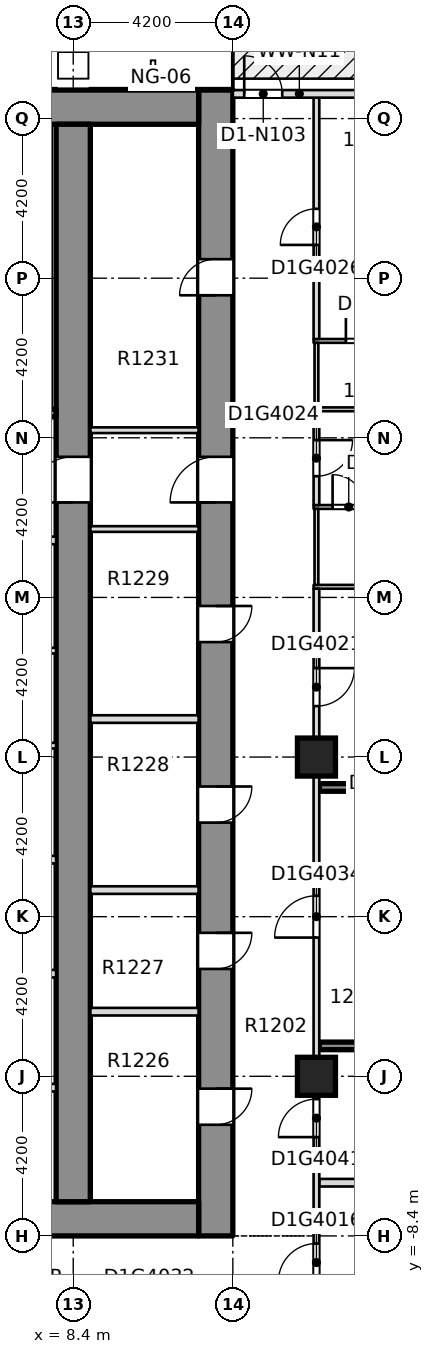
"""IFC4 building model, lengths in metres.
Left out: names, types, materials, properties, quantities, classifications, styles, units other than length and angle.
Written with IfcOpenShell. Run it as: python <this file> out.ifc"""

import sys

from ifc_helpers import new_model, si_unit, direction, frame, frame_2d, origin, origin_2d, place, context, subcontext, project, spatial, rectangle, extrude, element, fill, save


model = new_model("IFC4")
c1 = context("Model", 3, precision=1e-05, world=origin(), true_north=direction((0.0, 1.0)))
c2 = subcontext(c1, "Body", "Model", "MODEL_VIEW")
j1 = project(units=[si_unit("LENGTHUNIT", "METRE"), si_unit("PLANEANGLEUNIT", "RADIAN")], contexts=[c1])
p1 = place(None, origin())
s1 = spatial("IfcSite", under=j1, at=p1, CompositionType="ELEMENT")
p2 = place(p1, origin())
s2 = spatial("IfcBuilding", under=s1, at=p2, CompositionType="ELEMENT")
p3 = place(p2, frame((0.0, 0.0, 55.2)))
s3 = spatial("IfcBuildingStorey", under=s2, at=p3, CompositionType="ELEMENT", Elevation=55.2)
p4 = place(p3, frame((12.15, -8.4, -0.32), z_axis=(0.0, 0.0, 1.0), x_axis=(0.0, 1.0, 0.0)))
e1 = element("IfcWall", 1, at=p4, inside=s3, PredefinedType="SHEAR", context=c2, shape_type="SweptSolid", body=[
    extrude(rectangle(XDim=30.15, YDim=0.9, at=frame_2d((15.075, 0.0))), origin(), (0.0, 0.0, 1.0), 3.45),
])
p5 = place(p4, frame((2.925, 0.0, 0.32)))
e2 = element("IfcOpeningElement", 2, at=p5, cuts=e1, PredefinedType="OPENING", context=c2, shape_type="SweptSolid", body=[
    extrude(rectangle(XDim=0.95, YDim=2.1, at=frame_2d((0.475, 1.05))), frame((0.0, 0.46, 0.0), z_axis=(0.0, -1.0, 0.0), x_axis=(1.0, 0.0, 0.0)), (0.0, 0.0, 1.0), 0.92),
])
p6 = place(p4, frame((7.025, 0.0, 0.32)))
e3 = element("IfcOpeningElement", 3, at=p6, cuts=e1, PredefinedType="OPENING", context=c2, shape_type="SweptSolid", body=[
    extrude(rectangle(XDim=0.95, YDim=2.1, at=frame_2d((0.475, 1.05))), frame((0.0, 0.46, 0.0), z_axis=(0.0, -1.0, 0.0), x_axis=(1.0, 0.0, 0.0)), (0.0, 0.0, 1.0), 0.92),
])
p7 = place(p4, frame((10.875, 0.0, 0.32)))
e4 = element("IfcOpeningElement", 4, at=p7, cuts=e1, PredefinedType="OPENING", context=c2, shape_type="SweptSolid", body=[
    extrude(rectangle(XDim=0.95, YDim=2.1, at=frame_2d((0.475, 1.05))), frame((0.0, 0.46, 0.0), z_axis=(0.0, -1.0, 0.0), x_axis=(1.0, 0.0, 0.0)), (0.0, 0.0, 1.0), 0.92),
])
p8 = place(p4, frame((15.625, 0.0, 0.32)))
e5 = element("IfcOpeningElement", 5, at=p8, cuts=e1, PredefinedType="OPENING", context=c2, shape_type="SweptSolid", body=[
    extrude(rectangle(XDim=0.95, YDim=2.1, at=frame_2d((0.475, 1.05))), frame((0.0, 0.46, 0.0), z_axis=(0.0, -1.0, 0.0), x_axis=(1.0, 0.0, 0.0)), (0.0, 0.0, 1.0), 0.92),
])
p9 = place(p4, frame((24.75, 0.0, 0.32)))
e6 = element("IfcOpeningElement", 6, at=p9, cuts=e1, PredefinedType="OPENING", context=c2, shape_type="SweptSolid", body=[
    extrude(rectangle(XDim=0.95, YDim=2.1, at=frame_2d((0.475, 1.05))), frame((0.0, 0.46, 0.0), z_axis=(0.0, -1.0, 0.0), x_axis=(1.0, 0.0, 0.0)), (0.0, 0.0, 1.0), 0.92),
])
p10 = place(p4, frame((19.3, 0.0, 0.32)))
e7 = element("IfcOpeningElement", 7, at=p10, cuts=e1, PredefinedType="OPENING", context=c2, shape_type="SweptSolid", body=[
    extrude(rectangle(XDim=1.2, YDim=2.1, at=frame_2d((0.6, 1.05))), frame((0.0, 0.46, 0.0), z_axis=(0.0, -1.0, 0.0), x_axis=(1.0, 0.0, 0.0)), (0.0, 0.0, 1.0), 0.92),
])
p11 = place(p3, frame((-11.7, -7.95, -0.32), z_axis=(0.0, 0.0, 1.0), x_axis=(1.0, 0.0, 0.0)))
e8 = element("IfcWall", 8, at=p11, inside=s3, PredefinedType="SHEAR", context=c2, shape_type="SweptSolid", body=[
    extrude(rectangle(XDim=23.4, YDim=0.9, at=frame_2d((11.7, 0.0))), origin(), (0.0, 0.0, 1.0), 3.45),
])
p12 = place(p11, frame((6.95, 0.0, 0.32)))
e9 = element("IfcOpeningElement", 9, at=p12, cuts=e8, PredefinedType="OPENING", context=c2, shape_type="SweptSolid", body=[
    extrude(rectangle(XDim=1.8, YDim=2.1, at=frame_2d((0.9, 1.05))), frame((0.0, 0.46, 0.0), z_axis=(0.0, -1.0, 0.0), x_axis=(1.0, 0.0, 0.0)), (0.0, 0.0, 1.0), 0.92),
])
p13 = place(p11, frame((14.65, 0.0, 0.32)))
e10 = element("IfcOpeningElement", 10, at=p13, cuts=e8, PredefinedType="OPENING", context=c2, shape_type="SweptSolid", body=[
    extrude(rectangle(XDim=1.8, YDim=2.1, at=frame_2d((0.9, 1.05))), frame((0.0, 0.46, 0.0), z_axis=(0.0, -1.0, 0.0), x_axis=(1.0, 0.0, 0.0)), (0.0, 0.0, 1.0), 0.92),
])
p14 = place(p3, frame((-11.7, 21.3, -0.32), z_axis=(0.0, 0.0, 1.0), x_axis=(1.0, 0.0, 0.0)))
e11 = element("IfcWall", 11, at=p14, inside=s3, PredefinedType="SOLIDWALL", context=c2, shape_type="SweptSolid", body=[
    extrude(rectangle(XDim=23.4, YDim=0.9, at=frame_2d((11.7, 0.0))), origin(), (0.0, 0.0, 1.0), 3.45),
])
p15 = place(p3, frame((8.4, -7.5, -0.32), z_axis=(0.0, 0.0, 1.0), x_axis=(0.0, 1.0, 0.0)))
e12 = element("IfcWall", 12, at=p15, inside=s3, PredefinedType="SHEAR", context=c2, shape_type="SweptSolid", body=[
    extrude(rectangle(XDim=28.35, YDim=0.9, at=frame_2d((14.175, 0.0))), origin(), (0.0, 0.0, 1.0), 3.45),
])
p16 = place(p15, frame((18.4, 0.0, 0.32)))
e13 = element("IfcOpeningElement", 13, at=p16, cuts=e12, PredefinedType="OPENING", context=c2, shape_type="SweptSolid", body=[
    extrude(rectangle(XDim=1.2, YDim=2.1, at=frame_2d((0.6, 1.05))), frame((0.0, 0.46, 0.0), z_axis=(0.0, -1.0, 0.0), x_axis=(1.0, 0.0, 0.0)), (0.0, 0.0, 1.0), 0.92),
])
for number, where, z_axis, x_axis in (
    (14, (14.8, -4.2, -0.32), (0.0, 0.0, 1.0), (1.0, 0.0, 0.0)),
    (15, (14.8, 4.2, -0.32), (0.0, 0.0, 1.0), (1.0, 0.0, 0.0)),
):
    element("IfcColumn", number, at=place(p3, frame(where, z_axis=z_axis, x_axis=x_axis)), inside=s3, PredefinedType="COLUMN", context=c2, shape_type="SweptSolid", body=[
        extrude(rectangle(XDim=1.0, YDim=1.0, at=origin_2d()), origin(), (0.0, 0.0, 1.0), 3.45),
    ])
p17 = place(p3, frame((14.875, -7.0, 0.0), z_axis=(0.0, 0.0, 1.0), x_axis=(1.0, 0.0, 0.0)))
e16 = element("IfcWall", 16, at=p17, inside=s3, PredefinedType="PARTITIONING", context=c2, shape_type="SweptSolid", body=[
    extrude(rectangle(XDim=10.875, YDim=0.2, at=frame_2d((5.438, 0.0))), origin(), (0.0, 0.0, 1.0), 3.13),
])
p18 = place(p3, frame((14.875, -3.4, 0.0), z_axis=(0.0, 0.0, 1.0), x_axis=(1.0, 0.0, 0.0)))
e17 = element("IfcWall", 17, at=p18, inside=s3, PredefinedType="SOLIDWALL", context=c2, shape_type="SweptSolid", body=[
    extrude(rectangle(XDim=8.725, YDim=0.2, at=frame_2d((4.363, 0.0))), origin(), (0.0, 0.0, 1.0), 3.13),
])
p19 = place(p3, frame((14.875, 3.4, 0.0), z_axis=(0.0, 0.0, 1.0), x_axis=(1.0, 0.0, 0.0)))
e18 = element("IfcWall", 18, at=p19, inside=s3, PredefinedType="SOLIDWALL", context=c2, shape_type="SweptSolid", body=[
    extrude(rectangle(XDim=5.575, YDim=0.2, at=frame_2d((2.788, 0.0))), origin(), (0.0, 0.0, 1.0), 3.13),
])
p20 = place(p3, frame((14.725, 8.68, 0.0), z_axis=(0.0, 0.0, 1.0), x_axis=(1.0, 0.0, 0.0)))
e19 = element("IfcWall", 19, at=p20, inside=s3, PredefinedType="PARTITIONING", context=c2, shape_type="SweptSolid", body=[
    extrude(rectangle(XDim=2.525, YDim=0.1, at=frame_2d((1.262, 0.0))), origin(), (0.0, 0.0, 1.0), 3.13),
])
p21 = place(p3, frame((14.725, 10.78, 0.0), z_axis=(0.0, 0.0, 1.0), x_axis=(1.0, 0.0, 0.0)))
e20 = element("IfcWall", 20, at=p21, inside=s3, PredefinedType="PARTITIONING", context=c2, shape_type="SweptSolid", body=[
    extrude(rectangle(XDim=2.525, YDim=0.1, at=frame_2d((1.262, 0.0))), origin(), (0.0, 0.0, 1.0), 3.13),
])
p22 = place(p21, frame((0.5, 0.0, 0.0)))
e21 = element("IfcOpeningElement", 21, at=p22, cuts=e20, PredefinedType="OPENING", context=c2, shape_type="SweptSolid", body=[
    extrude(rectangle(XDim=0.85, YDim=2.1, at=frame_2d((0.425, 1.05))), frame((0.0, 0.06, 0.0), z_axis=(0.0, -1.0, 0.0), x_axis=(1.0, 0.0, 0.0)), (0.0, 0.0, 1.0), 0.12),
])
p23 = place(p3, frame((14.725, 13.35, 0.0), z_axis=(0.0, 0.0, 1.0), x_axis=(1.0, 0.0, 0.0)))
e22 = element("IfcWall", 22, at=p23, inside=s3, PredefinedType="PARTITIONING", context=c2, shape_type="SweptSolid", body=[
    extrude(rectangle(XDim=2.525, YDim=0.1, at=frame_2d((1.262, 0.0))), origin(), (0.0, 0.0, 1.0), 3.13),
])
p24 = place(p3, frame((14.725, 15.15, 0.0), z_axis=(0.0, 0.0, 1.0), x_axis=(1.0, 0.0, 0.0)))
e23 = element("IfcWall", 23, at=p24, inside=s3, PredefinedType="PARTITIONING", context=c2, shape_type="SweptSolid", body=[
    extrude(rectangle(XDim=2.525, YDim=0.1, at=frame_2d((1.262, 0.0))), origin(), (0.0, 0.0, 1.0), 3.13),
])
p25 = place(p24, frame((0.85, 0.0, 0.0)))
e24 = element("IfcOpeningElement", 24, at=p25, cuts=e23, PredefinedType="OPENING", context=c2, shape_type="SweptSolid", body=[
    extrude(rectangle(XDim=0.85, YDim=2.1, at=frame_2d((0.425, 1.05))), frame((0.0, 0.06, 0.0), z_axis=(0.0, -1.0, 0.0), x_axis=(1.0, 0.0, 0.0)), (0.0, 0.0, 1.0), 0.12),
])
p26 = place(p3, frame((14.8, -10.525, 0.0), z_axis=(0.0, 0.0, 1.0), x_axis=(0.0, 1.0, 0.0)))
e25 = element("IfcWall", 25, at=p26, inside=s3, PredefinedType="PARTITIONING", context=c2, shape_type="SweptSolid", body=[
    extrude(rectangle(XDim=19.155, YDim=0.15, at=frame_2d((9.577, 0.0))), origin(), (0.0, 0.0, 1.0), 3.13),
])
p27 = place(p26, frame((0.925, 0.0, 0.0)))
e26 = element("IfcOpeningElement", 26, at=p27, cuts=e25, PredefinedType="OPENING", context=c2, shape_type="SweptSolid", body=[
    extrude(rectangle(XDim=1.0, YDim=2.1, at=frame_2d((0.5, 1.05))), frame((0.0, 0.085, 0.0), z_axis=(0.0, -1.0, 0.0), x_axis=(1.0, 0.0, 0.0)), (0.0, 0.0, 1.0), 0.17),
])
p28 = place(p26, frame((16.065, 0.0, 0.0)))
e27 = element("IfcOpeningElement", 27, at=p28, cuts=e25, PredefinedType="OPENING", context=c2, shape_type="SweptSolid", body=[
    extrude(rectangle(XDim=1.0, YDim=2.1, at=frame_2d((0.5, 1.05))), frame((0.0, 0.085, 0.0), z_axis=(0.0, -1.0, 0.0), x_axis=(1.0, 0.0, 0.0)), (0.0, 0.0, 1.0), 0.17),
])
p29 = place(p26, frame((9.975, 0.0, 0.0)))
e28 = element("IfcOpeningElement", 28, at=p29, cuts=e25, PredefinedType="OPENING", context=c2, shape_type="SweptSolid", body=[
    extrude(rectangle(XDim=1.1, YDim=2.1, at=frame_2d((0.55, 1.05))), frame((0.0, 0.085, 0.0), z_axis=(0.0, -1.0, 0.0), x_axis=(1.0, 0.0, 0.0)), (0.0, 0.0, 1.0), 0.17),
])
p30 = place(p26, frame((4.725, 0.0, 0.0)))
e29 = element("IfcOpeningElement", 29, at=p30, cuts=e25, PredefinedType="OPENING", context=c2, shape_type="SweptSolid", body=[
    extrude(rectangle(XDim=1.0, YDim=2.1, at=frame_2d((0.5, 1.05))), frame((0.0, 0.085, 0.0), z_axis=(0.0, -1.0, 0.0), x_axis=(1.0, 0.0, 0.0)), (0.0, 0.0, 1.0), 0.17),
])
p31 = place(p3, frame((14.8, 8.73, 0.0), z_axis=(0.0, 0.0, 1.0), x_axis=(0.0, 1.0, 0.0)))
e30 = element("IfcWall", 30, at=p31, inside=s3, PredefinedType="PARTITIONING", context=c2, shape_type="SweptSolid", body=[
    extrude(rectangle(XDim=2.0, YDim=0.1, at=frame_2d((1.0, 0.0))), origin(), (0.0, 0.0, 1.0), 3.13),
])
p32 = place(p3, frame((14.8, 10.83, 0.0), z_axis=(0.0, 0.0, 1.0), x_axis=(0.0, 1.0, 0.0)))
e31 = element("IfcWall", 31, at=p32, inside=s3, PredefinedType="PARTITIONING", context=c2, shape_type="SweptSolid", body=[
    extrude(rectangle(XDim=2.47, YDim=0.15, at=frame_2d((1.235, 0.0))), origin(), (0.0, 0.0, 1.0), 3.13),
])
p33 = place(p32, frame((0.76, 0.0, 0.0)))
e32 = element("IfcOpeningElement", 32, at=p33, cuts=e31, PredefinedType="OPENING", context=c2, shape_type="SweptSolid", body=[
    extrude(rectangle(XDim=0.95, YDim=2.1, at=frame_2d((0.475, 1.05))), frame((0.0, 0.085, 0.0), z_axis=(0.0, -1.0, 0.0), x_axis=(1.0, 0.0, 0.0)), (0.0, 0.0, 1.0), 0.17),
])
p34 = place(p3, frame((14.8, 13.4, 0.0), z_axis=(0.0, 0.0, 1.0), x_axis=(0.0, 1.0, 0.0)))
e33 = element("IfcWall", 33, at=p34, inside=s3, PredefinedType="PARTITIONING", context=c2, shape_type="SweptSolid", body=[
    extrude(rectangle(XDim=1.7, YDim=0.1, at=frame_2d((0.85, 0.0))), origin(), (0.0, 0.0, 1.0), 3.13),
])
p35 = place(p3, frame((14.8, 15.2, 0.0), z_axis=(0.0, 0.0, 1.0), x_axis=(0.0, 1.0, 0.0)))
e34 = element("IfcWall", 34, at=p35, inside=s3, PredefinedType="PARTITIONING", context=c2, shape_type="SweptSolid", body=[
    extrude(rectangle(XDim=6.35, YDim=0.15, at=frame_2d((3.175, 0.0))), origin(), (0.0, 0.0, 1.0), 3.13),
])
p36 = place(p35, frame((2.475, 0.0, 0.0)))
e35 = element("IfcOpeningElement", 35, at=p36, cuts=e34, PredefinedType="OPENING", context=c2, shape_type="SweptSolid", body=[
    extrude(rectangle(XDim=0.95, YDim=2.1, at=frame_2d((0.475, 1.05))), frame((0.0, 0.085, 0.0), z_axis=(0.0, -1.0, 0.0), x_axis=(1.0, 0.0, 0.0)), (0.0, 0.0, 1.0), 0.17),
])
p37 = place(p3, frame((16.1, 21.65, 0.0), z_axis=(0.0, 0.0, 1.0), x_axis=(-1.0, 0.0, 0.0)))
e36 = element("IfcWall", 36, at=p37, inside=s3, PredefinedType="STANDARD", context=c2, shape_type="SweptSolid", body=[
    extrude(rectangle(XDim=3.5, YDim=0.2, at=frame_2d((1.75, 0.0))), origin(), (0.0, 0.0, 1.0), 3.13),
])
p38 = place(p37, frame((2.2, 0.0, 0.0)))
e37 = element("IfcOpeningElement", 37, at=p38, cuts=e36, PredefinedType="OPENING", context=c2, shape_type="SweptSolid", body=[
    extrude(rectangle(XDim=1.0, YDim=2.4, at=frame_2d((0.5, 1.2))), frame((0.0, 0.11, 0.0), z_axis=(0.0, -1.0, 0.0), x_axis=(1.0, 0.0, 0.0)), (0.0, 0.0, 1.0), 0.22),
])
for number, where, z_axis, x_axis in (
    (38, (5.575, -4.5, 0.0), (0.0, 0.0, 1.0), (1.0, 0.0, 0.0)),
    (39, (5.575, -1.5, 0.0), (0.0, 0.0, 1.0), (1.0, 0.0, 0.0)),
    (40, (5.575, 1.5, 0.0), (0.0, 0.0, 1.0), (1.0, 0.0, 0.0)),
):
    element("IfcWall", number, at=place(p3, frame(where, z_axis=z_axis, x_axis=x_axis)), inside=s3, PredefinedType="PARTITIONING", context=c2, shape_type="SweptSolid", body=[
        extrude(rectangle(XDim=2.374, YDim=0.2, at=frame_2d((1.187, 0.0))), origin(), (0.0, 0.0, 1.0), 3.13),
    ])
p39 = place(p3, frame((5.425, 4.5, 0.0), z_axis=(0.0, 0.0, 1.0), x_axis=(1.0, 0.0, 0.0)))
e41 = element("IfcWall", 41, at=p39, inside=s3, PredefinedType="PARTITIONING", context=c2, shape_type="SweptSolid", body=[
    extrude(rectangle(XDim=2.524, YDim=0.15, at=frame_2d((1.262, 0.0))), origin(), (0.0, 0.0, 1.0), 3.13),
])
p40 = place(p3, frame((-7.949, 7.0, 0.0), z_axis=(0.0, 0.0, 1.0), x_axis=(1.0, 0.0, 0.0)))
e42 = element("IfcWall", 42, at=p40, inside=s3, PredefinedType="PARTITIONING", context=c2, shape_type="SweptSolid", body=[
    extrude(rectangle(XDim=15.898, YDim=0.15, at=frame_2d((7.949, 0.0))), origin(), (0.0, 0.0, 1.0), 3.13),
])
p41 = place(p40, frame((7.249, 0.0, 0.0)))
e43 = element("IfcOpeningElement", 43, at=p41, cuts=e42, PredefinedType="OPENING", context=c2, shape_type="SweptSolid", body=[
    extrude(rectangle(XDim=1.4, YDim=2.1, at=frame_2d((0.7, 1.05))), frame((0.0, 0.085, 0.0), z_axis=(0.0, -1.0, 0.0), x_axis=(1.0, 0.0, 0.0)), (0.0, 0.0, 1.0), 0.17),
])
p42 = place(p3, frame((3.6, 9.9, 0.0), z_axis=(0.0, 0.0, 1.0), x_axis=(1.0, 0.0, 0.0)))
e44 = element("IfcWall", 44, at=p42, inside=s3, PredefinedType="PARTITIONING", context=c2, shape_type="SweptSolid", body=[
    extrude(rectangle(XDim=4.349, YDim=0.2, at=frame_2d((2.174, 0.0))), origin(), (0.0, 0.0, 1.0), 3.13),
])
p43 = place(p42, frame((2.25, 0.0, 0.0)))
e45 = element("IfcOpeningElement", 45, at=p43, cuts=e44, PredefinedType="OPENING", context=c2, shape_type="SweptSolid", body=[
    extrude(rectangle(XDim=1.1, YDim=2.1, at=frame_2d((0.55, 1.05))), frame((0.0, 0.11, 0.0), z_axis=(0.0, -1.0, 0.0), x_axis=(1.0, 0.0, 0.0)), (0.0, 0.0, 1.0), 0.22),
])
p44 = place(p3, frame((3.425, 13.25, 0.0), z_axis=(0.0, 0.0, 1.0), x_axis=(1.0, 0.0, 0.0)))
e46 = element("IfcWall", 46, at=p44, inside=s3, PredefinedType="SOLIDWALL", context=c2, shape_type="SweptSolid", body=[
    extrude(rectangle(XDim=4.524, YDim=0.2, at=frame_2d((2.262, 0.0))), origin(), (0.0, 0.0, 1.0), 3.13),
])
p45 = place(p44, frame((1.825, 0.0, 0.0)))
e47 = element("IfcOpeningElement", 47, at=p45, cuts=e46, PredefinedType="OPENING", context=c2, shape_type="SweptSolid", body=[
    extrude(rectangle(XDim=1.2, YDim=2.1, at=frame_2d((0.6, 1.05))), frame((0.0, 0.11, 0.0), z_axis=(0.0, -1.0, 0.0), x_axis=(1.0, 0.0, 0.0)), (0.0, 0.0, 1.0), 0.22),
])
for number, where, z_axis, x_axis in (
    (48, (8.851, -2.5, 0.0), (0.0, 0.0, 1.0), (1.0, 0.0, 0.0)),
    (49, (8.851, 0.7, 0.0), (0.0, 0.0, 1.0), (1.0, 0.0, 0.0)),
    (50, (8.851, 5.2, 0.0), (0.0, 0.0, 1.0), (1.0, 0.0, 0.0)),
):
    element("IfcWall", number, at=place(p3, frame(where, z_axis=z_axis, x_axis=x_axis)), inside=s3, PredefinedType="PARTITIONING", context=c2, shape_type="SweptSolid", body=[
        extrude(rectangle(XDim=2.848, YDim=0.2, at=frame_2d((1.424, 0.0))), origin(), (0.0, 0.0, 1.0), 3.13),
    ])
for number, where, z_axis, x_axis in (
    (51, (8.851, 10.2, 0.0), (0.0, 0.0, 1.0), (1.0, 0.0, 0.0)),
    (52, (8.851, 12.8, 0.0), (0.0, 0.0, 1.0), (1.0, 0.0, 0.0)),
):
    element("IfcWall", number, at=place(p3, frame(where, z_axis=z_axis, x_axis=x_axis)), inside=s3, PredefinedType="PARTITIONING", context=c2, shape_type="SweptSolid", body=[
        extrude(rectangle(XDim=2.848, YDim=0.15, at=frame_2d((1.424, 0.0))), origin(), (0.0, 0.0, 1.0), 3.13),
    ])
p46 = place(p27, origin())
e53 = element("IfcDoor", 53, at=p46, inside=s3, OperationType="SINGLE_SWING_RIGHT", PredefinedType="DOOR", context=c2, shape_type="SweptSolid", body=[
    extrude(rectangle(XDim=1.0, YDim=2.1, at=frame_2d((0.5, 1.05))), frame((0.0, 0.025, 0.0), z_axis=(0.0, -1.0, 0.0), x_axis=(1.0, 0.0, 0.0)), (0.0, 0.0, 1.0), 0.05),
])
fill(e26, e53)
p47 = place(p28, origin())
e54 = element("IfcDoor", 54, at=p47, inside=s3, OperationType="SINGLE_SWING_RIGHT", PredefinedType="DOOR", context=c2, shape_type="SweptSolid", body=[
    extrude(rectangle(XDim=1.0, YDim=2.1, at=frame_2d((0.5, 1.05))), frame((0.0, 0.025, 0.0), z_axis=(0.0, -1.0, 0.0), x_axis=(1.0, 0.0, 0.0)), (0.0, 0.0, 1.0), 0.05),
])
fill(e27, e54)
p48 = place(p33, origin())
e55 = element("IfcDoor", 55, at=p48, inside=s3, OperationType="SINGLE_SWING_RIGHT", PredefinedType="DOOR", context=c2, shape_type="SweptSolid", body=[
    extrude(rectangle(XDim=0.95, YDim=2.1, at=frame_2d((0.475, 1.05))), frame((0.0, 0.025, 0.0), z_axis=(0.0, -1.0, 0.0), x_axis=(1.0, 0.0, 0.0)), (0.0, 0.0, 1.0), 0.05),
])
fill(e32, e55)
p49 = place(p22, origin())
e56 = element("IfcDoor", 56, at=p49, inside=s3, OperationType="SINGLE_SWING_RIGHT", PredefinedType="DOOR", context=c2, shape_type="SweptSolid", body=[
    extrude(rectangle(XDim=0.85, YDim=2.1, at=frame_2d((0.425, 1.05))), frame((0.0, 0.025, 0.0), z_axis=(0.0, -1.0, 0.0), x_axis=(1.0, 0.0, 0.0)), (0.0, 0.0, 1.0), 0.05),
])
fill(e21, e56)
p50 = place(p36, origin())
e57 = element("IfcDoor", 57, at=p50, inside=s3, OperationType="SINGLE_SWING_LEFT", PredefinedType="DOOR", context=c2, shape_type="SweptSolid", body=[
    extrude(rectangle(XDim=0.95, YDim=2.1, at=frame_2d((0.475, 1.05))), frame((0.0, 0.025, 0.0), z_axis=(0.0, -1.0, 0.0), x_axis=(1.0, 0.0, 0.0)), (0.0, 0.0, 1.0), 0.05),
])
fill(e35, e57)
p51 = place(p25, origin())
e58 = element("IfcDoor", 58, at=p51, inside=s3, OperationType="SINGLE_SWING_RIGHT", PredefinedType="DOOR", context=c2, shape_type="SweptSolid", body=[
    extrude(rectangle(XDim=0.85, YDim=2.1, at=frame_2d((0.425, 1.05))), frame((0.0, 0.025, 0.0), z_axis=(0.0, -1.0, 0.0), x_axis=(1.0, 0.0, 0.0)), (0.0, 0.0, 1.0), 0.05),
])
fill(e24, e58)
p52 = place(p29, origin())
e59 = element("IfcDoor", 59, at=p52, inside=s3, OperationType="SINGLE_SWING_LEFT", PredefinedType="DOOR", context=c2, shape_type="SweptSolid", body=[
    extrude(rectangle(XDim=1.1, YDim=2.1, at=frame_2d((0.55, 1.05))), frame((0.0, 0.025, 0.0), z_axis=(0.0, -1.0, 0.0), x_axis=(1.0, 0.0, 0.0)), (0.0, 0.0, 1.0), 0.05),
])
fill(e28, e59)
p53 = place(p30, origin())
e60 = element("IfcDoor", 60, at=p53, inside=s3, OperationType="SINGLE_SWING_RIGHT", PredefinedType="DOOR", context=c2, shape_type="SweptSolid", body=[
    extrude(rectangle(XDim=1.0, YDim=2.1, at=frame_2d((0.5, 1.05))), frame((0.0, 0.025, 0.0), z_axis=(0.0, -1.0, 0.0), x_axis=(1.0, 0.0, 0.0)), (0.0, 0.0, 1.0), 0.05),
])
fill(e29, e60)
p54 = place(p38, origin())
e61 = element("IfcDoor", 61, at=p54, inside=s3, OperationType="SINGLE_SWING_LEFT", PredefinedType="DOOR", context=c2, shape_type="SweptSolid", body=[
    extrude(rectangle(XDim=1.0, YDim=2.4, at=frame_2d((0.5, 1.2))), frame((0.0, 0.025, 0.0), z_axis=(0.0, -1.0, 0.0), x_axis=(1.0, 0.0, 0.0)), (0.0, 0.0, 1.0), 0.05),
])
fill(e37, e61)
p55 = place(p5, origin())
e62 = element("IfcDoor", 62, at=p55, inside=s3, OperationType="SINGLE_SWING_LEFT", PredefinedType="DOOR", context=c2, shape_type="SweptSolid", body=[
    extrude(rectangle(XDim=0.95, YDim=2.1, at=frame_2d((0.475, 1.05))), frame((0.0, 0.025, 0.0), z_axis=(0.0, -1.0, 0.0), x_axis=(1.0, 0.0, 0.0)), (0.0, 0.0, 1.0), 0.05),
])
fill(e2, e62)
p56 = place(p6, origin())
e63 = element("IfcDoor", 63, at=p56, inside=s3, OperationType="SINGLE_SWING_LEFT", PredefinedType="DOOR", context=c2, shape_type="SweptSolid", body=[
    extrude(rectangle(XDim=0.95, YDim=2.1, at=frame_2d((0.475, 1.05))), frame((0.0, 0.025, 0.0), z_axis=(0.0, -1.0, 0.0), x_axis=(1.0, 0.0, 0.0)), (0.0, 0.0, 1.0), 0.05),
])
fill(e3, e63)
p57 = place(p7, origin())
e64 = element("IfcDoor", 64, at=p57, inside=s3, OperationType="SINGLE_SWING_LEFT", PredefinedType="DOOR", context=c2, shape_type="SweptSolid", body=[
    extrude(rectangle(XDim=0.95, YDim=2.1, at=frame_2d((0.475, 1.05))), frame((0.0, 0.025, 0.0), z_axis=(0.0, -1.0, 0.0), x_axis=(1.0, 0.0, 0.0)), (0.0, 0.0, 1.0), 0.05),
])
fill(e4, e64)
p58 = place(p8, origin())
e65 = element("IfcDoor", 65, at=p58, inside=s3, OperationType="SINGLE_SWING_LEFT", PredefinedType="DOOR", context=c2, shape_type="SweptSolid", body=[
    extrude(rectangle(XDim=0.95, YDim=2.1, at=frame_2d((0.475, 1.05))), frame((0.0, 0.025, 0.0), z_axis=(0.0, -1.0, 0.0), x_axis=(1.0, 0.0, 0.0)), (0.0, 0.0, 1.0), 0.05),
])
fill(e5, e65)
p59 = place(p9, origin())
e66 = element("IfcDoor", 66, at=p59, inside=s3, OperationType="SINGLE_SWING_LEFT", PredefinedType="DOOR", context=c2, shape_type="SweptSolid", body=[
    extrude(rectangle(XDim=0.95, YDim=2.1, at=frame_2d((0.475, 1.05))), frame((0.0, 0.025, 0.0), z_axis=(0.0, -1.0, 0.0), x_axis=(1.0, 0.0, 0.0)), (0.0, 0.0, 1.0), 0.05),
])
fill(e6, e66)
p60 = place(p10, origin())
e67 = element("IfcDoor", 67, at=p60, inside=s3, OperationType="SINGLE_SWING_LEFT", PredefinedType="DOOR", context=c2, shape_type="SweptSolid", body=[
    extrude(rectangle(XDim=1.2, YDim=2.1, at=frame_2d((0.6, 1.05))), frame((0.0, 0.025, 0.0), z_axis=(0.0, -1.0, 0.0), x_axis=(1.0, 0.0, 0.0)), (0.0, 0.0, 1.0), 0.05),
])
fill(e7, e67)
p61 = place(p16, origin())
e68 = element("IfcDoor", 68, at=p61, inside=s3, OperationType="SINGLE_SWING_LEFT", PredefinedType="DOOR", context=c2, shape_type="SweptSolid", body=[
    extrude(rectangle(XDim=1.2, YDim=2.1, at=frame_2d((0.6, 1.05))), frame((0.0, 0.025, 0.0), z_axis=(0.0, -1.0, 0.0), x_axis=(1.0, 0.0, 0.0)), (0.0, 0.0, 1.0), 0.05),
])
fill(e13, e68)
save(model, sys.argv[1])
